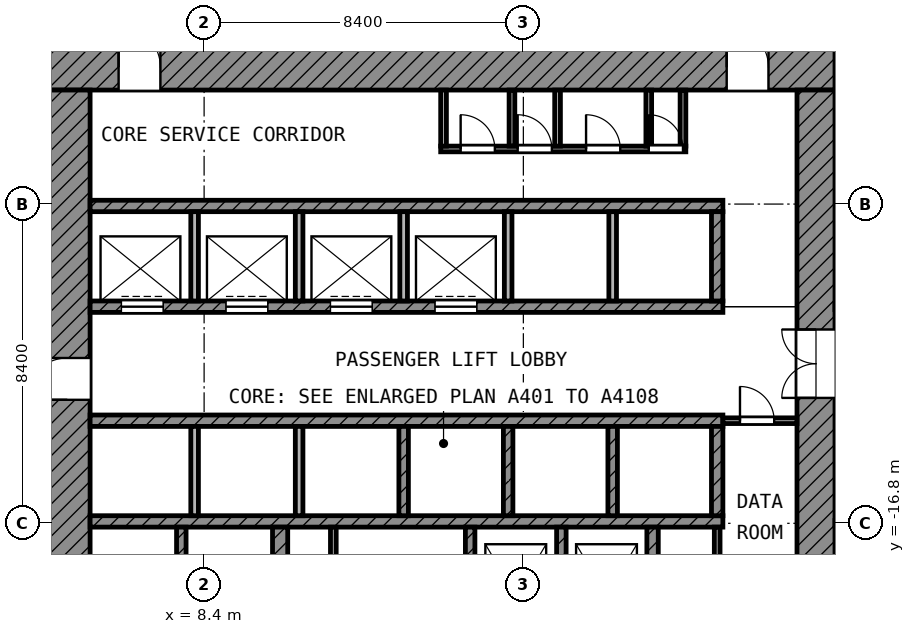
"""IFC4 building model, lengths in metres.
Left out: names, types, materials, properties, quantities, classifications, styles, units other than length and angle.
Written with IfcOpenShell. Run it as: python <this file> out.ifc"""

import sys

from ifc_helpers import new_model, si_unit, direction, frame, frame_2d, origin, place, context, subcontext, project, spatial, rectangle, extrude, element, fill, save


model = new_model("IFC4")
c1 = context("Model", 3, precision=1e-05, world=origin(), true_north=direction((0.0, 1.0)))
c2 = subcontext(c1, "Body", "Model", "MODEL_VIEW")
j1 = project(units=[si_unit("LENGTHUNIT", "METRE"), si_unit("PLANEANGLEUNIT", "RADIAN")], contexts=[c1])
p1 = place(None, origin())
s1 = spatial("IfcSite", under=j1, at=p1, CompositionType="ELEMENT")
p2 = place(p1, origin())
s2 = spatial("IfcBuilding", under=s1, at=p2, CompositionType="ELEMENT")
p3 = place(p2, frame((0.0, 0.0, 107.2)))
s3 = spatial("IfcBuildingStorey", under=s2, at=p3, CompositionType="ELEMENT", Elevation=107.2)
p4 = place(p3, frame((4.2, -4.8, 0.0), z_axis=(0.0, 0.0, 1.0), x_axis=(1.0, 0.0, 0.0)))
e1 = element("IfcWall", 1, at=p4, inside=s3, PredefinedType="SHEAR", context=c2, shape_type="SweptSolid", body=[
    extrude(rectangle(XDim=20.8, YDim=1.2, at=frame_2d((10.4, 0.0))), origin(), (0.0, 0.0, 1.0), 3.6),
])
p5 = place(p4, frame((1.95, 0.0, 0.0)))
e2 = element("IfcOpeningElement", 2, at=p5, cuts=e1, PredefinedType="OPENING", context=c2, shape_type="SweptSolid", body=[
    extrude(rectangle(XDim=1.1, YDim=2.1, at=frame_2d((0.55, 1.05))), frame((0.0, 0.61, 0.0), z_axis=(0.0, -1.0, 0.0), x_axis=(1.0, 0.0, 0.0)), (0.0, 0.0, 1.0), 1.22),
])
p6 = place(p4, frame((17.95, 0.0, 0.0)))
e3 = element("IfcOpeningElement", 3, at=p6, cuts=e1, PredefinedType="OPENING", context=c2, shape_type="SweptSolid", body=[
    extrude(rectangle(XDim=1.1, YDim=2.1, at=frame_2d((0.55, 1.05))), frame((0.0, 0.61, 0.0), z_axis=(0.0, -1.0, 0.0), x_axis=(1.0, 0.0, 0.0)), (0.0, 0.0, 1.0), 1.22),
])
p7 = place(p3, frame((4.8, -25.0, 0.0), z_axis=(0.0, 0.0, 1.0), x_axis=(0.0, 1.0, 0.0)))
e4 = element("IfcWall", 4, at=p7, inside=s3, PredefinedType="SHEAR", context=c2, shape_type="SweptSolid", body=[
    extrude(rectangle(XDim=19.6, YDim=1.2, at=frame_2d((9.8, 0.0))), origin(), (0.0, 0.0, 1.0), 3.6),
])
p8 = place(p7, frame((11.45, 0.0, 0.0)))
e5 = element("IfcOpeningElement", 5, at=p8, cuts=e4, PredefinedType="OPENING", context=c2, shape_type="SweptSolid", body=[
    extrude(rectangle(XDim=1.1, YDim=2.1, at=frame_2d((0.55, 1.05))), frame((0.0, 0.61, 0.0), z_axis=(0.0, -1.0, 0.0), x_axis=(1.0, 0.0, 0.0)), (0.0, 0.0, 1.0), 1.22),
])
p9 = place(p7, frame((2.15, 0.0, 0.0)))
e6 = element("IfcOpeningElement", 6, at=p9, cuts=e4, PredefinedType="OPENING", context=c2, shape_type="SweptSolid", body=[
    extrude(rectangle(XDim=1.1, YDim=2.1, at=frame_2d((0.55, 1.05))), frame((0.0, 0.61, 0.0), z_axis=(0.0, -1.0, 0.0), x_axis=(1.0, 0.0, 0.0)), (0.0, 0.0, 1.0), 1.22),
])
p10 = place(p3, frame((24.5, -24.0, 0.0), z_axis=(0.0, 0.0, 1.0), x_axis=(0.0, 1.0, 0.0)))
e7 = element("IfcWall", 7, at=p10, inside=s3, PredefinedType="SHEAR", context=c2, shape_type="SweptSolid", body=[
    extrude(rectangle(XDim=18.6, YDim=1.0, at=frame_2d((9.3, 0.0))), origin(), (0.0, 0.0, 1.0), 3.6),
])
p11 = place(p10, frame((10.5, 0.0, 0.0)))
e8 = element("IfcOpeningElement", 8, at=p11, cuts=e7, PredefinedType="OPENING", context=c2, shape_type="SweptSolid", body=[
    extrude(rectangle(XDim=1.8, YDim=2.1, at=frame_2d((0.9, 1.05))), frame((0.0, 0.51, 0.0), z_axis=(0.0, -1.0, 0.0), x_axis=(1.0, 0.0, 0.0)), (0.0, 0.0, 1.0), 1.02),
])
p12 = place(p3, frame((5.4, -8.45, 0.0), z_axis=(0.0, 0.0, 1.0), x_axis=(1.0, 0.0, 0.0)))
e9 = element("IfcWall", 9, at=p12, inside=s3, PredefinedType="SHEAR", context=c2, shape_type="SweptSolid", body=[
    extrude(rectangle(XDim=16.65, YDim=0.3, at=frame_2d((8.325, 0.0))), origin(), (0.0, 0.0, 1.0), 3.6),
])
p13 = place(p3, frame((5.4, -11.1, 0.0), z_axis=(0.0, 0.0, 1.0), x_axis=(1.0, 0.0, 0.0)))
e10 = element("IfcWall", 10, at=p13, inside=s3, PredefinedType="SHEAR", context=c2, shape_type="SweptSolid", body=[
    extrude(rectangle(XDim=16.65, YDim=0.3, at=frame_2d((8.325, 0.0))), origin(), (0.0, 0.0, 1.0), 3.6),
])
p14 = place(p13, frame((0.825, 0.0, 0.0)))
e11 = element("IfcOpeningElement", 11, at=p14, cuts=e10, PredefinedType="OPENING", context=c2, shape_type="SweptSolid", body=[
    extrude(rectangle(XDim=1.1, YDim=2.1, at=frame_2d((0.55, 1.05))), frame((0.0, 0.16, 0.0), z_axis=(0.0, -1.0, 0.0), x_axis=(1.0, 0.0, 0.0)), (0.0, 0.0, 1.0), 0.32),
])
p15 = place(p13, frame((3.575, 0.0, 0.0)))
e12 = element("IfcOpeningElement", 12, at=p15, cuts=e10, PredefinedType="OPENING", context=c2, shape_type="SweptSolid", body=[
    extrude(rectangle(XDim=1.1, YDim=2.1, at=frame_2d((0.55, 1.05))), frame((0.0, 0.16, 0.0), z_axis=(0.0, -1.0, 0.0), x_axis=(1.0, 0.0, 0.0)), (0.0, 0.0, 1.0), 0.32),
])
p16 = place(p13, frame((6.325, 0.0, 0.0)))
e13 = element("IfcOpeningElement", 13, at=p16, cuts=e10, PredefinedType="OPENING", context=c2, shape_type="SweptSolid", body=[
    extrude(rectangle(XDim=1.1, YDim=2.1, at=frame_2d((0.55, 1.05))), frame((0.0, 0.16, 0.0), z_axis=(0.0, -1.0, 0.0), x_axis=(1.0, 0.0, 0.0)), (0.0, 0.0, 1.0), 0.32),
])
p17 = place(p13, frame((9.075, 0.0, 0.0)))
e14 = element("IfcOpeningElement", 14, at=p17, cuts=e10, PredefinedType="OPENING", context=c2, shape_type="SweptSolid", body=[
    extrude(rectangle(XDim=1.1, YDim=2.1, at=frame_2d((0.55, 1.05))), frame((0.0, 0.16, 0.0), z_axis=(0.0, -1.0, 0.0), x_axis=(1.0, 0.0, 0.0)), (0.0, 0.0, 1.0), 0.32),
])
for number, where, z_axis, x_axis in (
    (15, (5.4, -14.1, 0.0), (0.0, 0.0, 1.0), (1.0, 0.0, 0.0)),
    (16, (5.4, -16.75, 0.0), (0.0, 0.0, 1.0), (1.0, 0.0, 0.0)),
):
    element("IfcWall", number, at=place(p3, frame(where, z_axis=z_axis, x_axis=x_axis)), inside=s3, PredefinedType="SHEAR", context=c2, shape_type="SweptSolid", body=[
        extrude(rectangle(XDim=16.65, YDim=0.3, at=frame_2d((8.325, 0.0))), origin(), (0.0, 0.0, 1.0), 3.6),
    ])
p18 = place(p3, frame((10.4, -20.05, 0.0), z_axis=(0.0, 0.0, 1.0), x_axis=(0.0, 1.0, 0.0)))
e17 = element("IfcWall", 17, at=p18, inside=s3, PredefinedType="SHEAR", context=c2, shape_type="SweptSolid", body=[
    extrude(rectangle(XDim=3.15, YDim=0.4, at=frame_2d((1.575, 0.0))), origin(), (0.0, 0.0, 1.0), 3.6),
])
p19 = place(p3, frame((20.2, -20.35, 0.0), z_axis=(0.0, 0.0, 1.0), x_axis=(0.0, 1.0, 0.0)))
e18 = element("IfcWall", 18, at=p19, inside=s3, PredefinedType="SHEAR", context=c2, shape_type="SweptSolid", body=[
    extrude(rectangle(XDim=3.45, YDim=0.3, at=frame_2d((1.725, 0.0))), origin(), (0.0, 0.0, 1.0), 3.6),
])
p20 = place(p3, frame((21.9, -10.95, 0.0), z_axis=(0.0, 0.0, 1.0), x_axis=(0.0, 1.0, 0.0)))
e19 = element("IfcWall", 19, at=p20, inside=s3, PredefinedType="SHEAR", context=c2, shape_type="SweptSolid", body=[
    extrude(rectangle(XDim=2.35, YDim=0.3, at=frame_2d((1.175, 0.0))), origin(), (0.0, 0.0, 1.0), 3.6),
])
p21 = place(p3, frame((21.9, -16.6, 0.0), z_axis=(0.0, 0.0, 1.0), x_axis=(0.0, 1.0, 0.0)))
e20 = element("IfcWall", 20, at=p21, inside=s3, PredefinedType="SHEAR", context=c2, shape_type="SweptSolid", body=[
    extrude(rectangle(XDim=2.35, YDim=0.3, at=frame_2d((1.175, 0.0))), origin(), (0.0, 0.0, 1.0), 3.6),
])
for number, where, z_axis, x_axis in (
    (21, (7.8, -20.05, 0.0), (0.0, 0.0, 1.0), (0.0, 1.0, 0.0)),
    (22, (15.4, -20.05, 0.0), (0.0, 0.0, 1.0), (0.0, 1.0, 0.0)),
    (23, (17.8, -20.05, 0.0), (0.0, 0.0, 1.0), (0.0, 1.0, 0.0)),
):
    element("IfcWall", number, at=place(p3, frame(where, z_axis=z_axis, x_axis=x_axis)), inside=s3, PredefinedType="SHEAR", context=c2, shape_type="SweptSolid", body=[
        extrude(rectangle(XDim=3.15, YDim=0.25, at=frame_2d((1.575, 0.0))), origin(), (0.0, 0.0, 1.0), 3.6),
    ])
for number, where, z_axis, x_axis in (
    (24, (8.15, -10.95, 0.0), (0.0, 0.0, 1.0), (0.0, 1.0, 0.0)),
    (25, (10.9, -10.95, 0.0), (0.0, 0.0, 1.0), (0.0, 1.0, 0.0)),
    (26, (13.65, -10.95, 0.0), (0.0, 0.0, 1.0), (0.0, 1.0, 0.0)),
    (27, (16.4, -10.95, 0.0), (0.0, 0.0, 1.0), (0.0, 1.0, 0.0)),
    (28, (19.15, -10.95, 0.0), (0.0, 0.0, 1.0), (0.0, 1.0, 0.0)),
):
    element("IfcWall", number, at=place(p3, frame(where, z_axis=z_axis, x_axis=x_axis)), inside=s3, PredefinedType="PARTITIONING", context=c2, shape_type="SweptSolid", body=[
        extrude(rectangle(XDim=2.35, YDim=0.2, at=frame_2d((1.175, 0.0))), origin(), (0.0, 0.0, 1.0), 3.6),
    ])
for number, where, z_axis, x_axis in (
    (29, (8.15, -16.6, 0.0), (0.0, 0.0, 1.0), (0.0, 1.0, 0.0)),
    (30, (10.9, -16.6, 0.0), (0.0, 0.0, 1.0), (0.0, 1.0, 0.0)),
):
    element("IfcWall", number, at=place(p3, frame(where, z_axis=z_axis, x_axis=x_axis)), inside=s3, PredefinedType="PARTITIONING", context=c2, shape_type="SweptSolid", body=[
        extrude(rectangle(XDim=2.35, YDim=0.2, at=frame_2d((1.175, 0.0))), origin(), (0.0, 0.0, 1.0), 3.6),
    ])
for number, where, z_axis, x_axis in (
    (31, (13.65, -16.6, 0.0), (0.0, 0.0, 1.0), (0.0, 1.0, 0.0)),
    (32, (16.4, -16.6, 0.0), (0.0, 0.0, 1.0), (0.0, 1.0, 0.0)),
    (33, (19.15, -16.6, 0.0), (0.0, 0.0, 1.0), (0.0, 1.0, 0.0)),
):
    element("IfcWall", number, at=place(p3, frame(where, z_axis=z_axis, x_axis=x_axis)), inside=s3, PredefinedType="SHEAR", context=c2, shape_type="SweptSolid", body=[
        extrude(rectangle(XDim=2.35, YDim=0.25, at=frame_2d((1.175, 0.0))), origin(), (0.0, 0.0, 1.0), 3.6),
    ])
p22 = place(p3, frame((21.9, -19.05, 0.0), z_axis=(0.0, 0.0, 1.0), x_axis=(0.0, 1.0, 0.0)))
e34 = element("IfcWall", 34, at=p22, inside=s3, PredefinedType="PARTITIONING", context=c2, shape_type="SweptSolid", body=[
    extrude(rectangle(XDim=2.15, YDim=0.15, at=frame_2d((1.075, 0.0))), origin(), (0.0, 0.0, 1.0), 3.6),
])
p23 = place(p3, frame((22.05, -14.1, 0.0), z_axis=(0.0, 0.0, 1.0), x_axis=(1.0, 0.0, 0.0)))
e35 = element("IfcWall", 35, at=p23, inside=s3, PredefinedType="PARTITIONING", context=c2, shape_type="SweptSolid", body=[
    extrude(rectangle(XDim=1.95, YDim=0.15, at=frame_2d((0.975, 0.0))), origin(), (0.0, 0.0, 1.0), 3.6),
])
p24 = place(p23, frame((0.45, 0.0, 0.0)))
e36 = element("IfcOpeningElement", 36, at=p24, cuts=e35, PredefinedType="OPENING", context=c2, shape_type="SweptSolid", body=[
    extrude(rectangle(XDim=0.9, YDim=2.1, at=frame_2d((0.45, 1.05))), frame((0.0, 0.085, 0.0), z_axis=(0.0, -1.0, 0.0), x_axis=(1.0, 0.0, 0.0)), (0.0, 0.0, 1.0), 0.17),
])
p25 = place(p3, frame((14.625, -6.95, 0.0), z_axis=(0.0, 0.0, 1.0), x_axis=(1.0, 0.0, 0.0)))
e37 = element("IfcWall", 37, at=p25, inside=s3, PredefinedType="PARTITIONING", context=c2, shape_type="SweptSolid", body=[
    extrude(rectangle(XDim=6.45, YDim=0.15, at=frame_2d((3.225, 0.0))), origin(), (0.0, 0.0, 1.0), 3.6),
])
p26 = place(p25, frame((0.525, 0.0, 0.0)))
e38 = element("IfcOpeningElement", 38, at=p26, cuts=e37, PredefinedType="OPENING", context=c2, shape_type="SweptSolid", body=[
    extrude(rectangle(XDim=0.9, YDim=2.1, at=frame_2d((0.45, 1.05))), frame((0.0, 0.085, 0.0), z_axis=(0.0, -1.0, 0.0), x_axis=(1.0, 0.0, 0.0)), (0.0, 0.0, 1.0), 0.17),
])
p27 = place(p25, frame((2.025, 0.0, 0.0)))
e39 = element("IfcOpeningElement", 39, at=p27, cuts=e37, PredefinedType="OPENING", context=c2, shape_type="SweptSolid", body=[
    extrude(rectangle(XDim=0.9, YDim=2.1, at=frame_2d((0.45, 1.05))), frame((0.0, 0.085, 0.0), z_axis=(0.0, -1.0, 0.0), x_axis=(1.0, 0.0, 0.0)), (0.0, 0.0, 1.0), 0.17),
])
p28 = place(p25, frame((3.825, 0.0, 0.0)))
e40 = element("IfcOpeningElement", 40, at=p28, cuts=e37, PredefinedType="OPENING", context=c2, shape_type="SweptSolid", body=[
    extrude(rectangle(XDim=0.9, YDim=2.1, at=frame_2d((0.45, 1.05))), frame((0.0, 0.085, 0.0), z_axis=(0.0, -1.0, 0.0), x_axis=(1.0, 0.0, 0.0)), (0.0, 0.0, 1.0), 0.17),
])
p29 = place(p25, frame((5.475, 0.0, 0.0)))
e41 = element("IfcOpeningElement", 41, at=p29, cuts=e37, PredefinedType="OPENING", context=c2, shape_type="SweptSolid", body=[
    extrude(rectangle(XDim=0.9, YDim=2.1, at=frame_2d((0.45, 1.05))), frame((0.0, 0.085, 0.0), z_axis=(0.0, -1.0, 0.0), x_axis=(1.0, 0.0, 0.0)), (0.0, 0.0, 1.0), 0.17),
])
p30 = place(p3, frame((11.8, -20.05, 0.0), z_axis=(0.0, 0.0, 1.0), x_axis=(0.0, 1.0, 0.0)))
e42 = element("IfcWall", 42, at=p30, inside=s3, PredefinedType="PARTITIONING", context=c2, shape_type="SweptSolid", body=[
    extrude(rectangle(XDim=3.15, YDim=0.15, at=frame_2d((1.575, 0.0))), origin(), (0.0, 0.0, 1.0), 3.6),
])
for number, where, z_axis, x_axis in (
    (43, (14.7, -6.875, 0.0), (0.0, 0.0, 1.0), (0.0, 1.0, 0.0)),
    (44, (16.5, -6.875, 0.0), (0.0, 0.0, 1.0), (0.0, 1.0, 0.0)),
    (45, (17.7, -6.875, 0.0), (0.0, 0.0, 1.0), (0.0, 1.0, 0.0)),
    (46, (20.1, -6.875, 0.0), (0.0, 0.0, 1.0), (0.0, 1.0, 0.0)),
    (47, (21.0, -6.875, 0.0), (0.0, 0.0, 1.0), (0.0, 1.0, 0.0)),
):
    element("IfcWall", number, at=place(p3, frame(where, z_axis=z_axis, x_axis=x_axis)), inside=s3, PredefinedType="PARTITIONING", context=c2, shape_type="SweptSolid", body=[
        extrude(rectangle(XDim=1.475, YDim=0.15, at=frame_2d((0.738, 0.0))), origin(), (0.0, 0.0, 1.0), 3.6),
    ])
p31 = place(p3, frame((25.0, -16.8, 0.0), z_axis=(0.0, 0.0, 1.0), x_axis=(1.0, 0.0, 0.0)))
e48 = element("IfcWall", 48, at=p31, inside=s3, PredefinedType="PARTITIONING", context=c2, shape_type="SweptSolid", body=[
    extrude(rectangle(XDim=54.72, YDim=0.15, at=frame_2d((27.36, 0.0))), origin(), (0.0, 0.0, 1.0), 3.6),
])
p32 = place(p31, frame((2.5, 0.0, 0.0)))
e49 = element("IfcOpeningElement", 49, at=p32, cuts=e48, PredefinedType="OPENING", context=c2, shape_type="SweptSolid", body=[
    extrude(rectangle(XDim=1.0, YDim=2.1, at=frame_2d((0.5, 1.05))), frame((0.0, 0.085, 0.0), z_axis=(0.0, -1.0, 0.0), x_axis=(1.0, 0.0, 0.0)), (0.0, 0.0, 1.0), 0.17),
])
p33 = place(p31, frame((1.1, 0.0, 0.0)))
e50 = element("IfcOpeningElement", 50, at=p33, cuts=e48, PredefinedType="OPENING", context=c2, shape_type="SweptSolid", body=[
    extrude(rectangle(XDim=1.0, YDim=2.1, at=frame_2d((0.5, 1.05))), frame((0.0, 0.085, 0.0), z_axis=(0.0, -1.0, 0.0), x_axis=(1.0, 0.0, 0.0)), (0.0, 0.0, 1.0), 0.17),
])
p34 = place(p31, frame((5.9, 0.0, 0.0)))
e51 = element("IfcOpeningElement", 51, at=p34, cuts=e48, PredefinedType="OPENING", context=c2, shape_type="SweptSolid", body=[
    extrude(rectangle(XDim=1.2, YDim=2.1, at=frame_2d((0.6, 1.05))), frame((0.0, 0.085, 0.0), z_axis=(0.0, -1.0, 0.0), x_axis=(1.0, 0.0, 0.0)), (0.0, 0.0, 1.0), 0.17),
])
p35 = place(p31, frame((10.05, 0.0, 0.0)))
e52 = element("IfcOpeningElement", 52, at=p35, cuts=e48, PredefinedType="OPENING", context=c2, shape_type="SweptSolid", body=[
    extrude(rectangle(XDim=1.0, YDim=2.1, at=frame_2d((0.5, 1.05))), frame((0.0, 0.085, 0.0), z_axis=(0.0, -1.0, 0.0), x_axis=(1.0, 0.0, 0.0)), (0.0, 0.0, 1.0), 0.17),
])
p36 = place(p31, frame((14.25, 0.0, 0.0)))
e53 = element("IfcOpeningElement", 53, at=p36, cuts=e48, PredefinedType="OPENING", context=c2, shape_type="SweptSolid", body=[
    extrude(rectangle(XDim=1.0, YDim=2.1, at=frame_2d((0.5, 1.05))), frame((0.0, 0.085, 0.0), z_axis=(0.0, -1.0, 0.0), x_axis=(1.0, 0.0, 0.0)), (0.0, 0.0, 1.0), 0.17),
])
p37 = place(p31, frame((18.75, 0.0, 0.0)))
e54 = element("IfcOpeningElement", 54, at=p37, cuts=e48, PredefinedType="OPENING", context=c2, shape_type="SweptSolid", body=[
    extrude(rectangle(XDim=1.0, YDim=2.1, at=frame_2d((0.5, 1.05))), frame((0.0, 0.085, 0.0), z_axis=(0.0, -1.0, 0.0), x_axis=(1.0, 0.0, 0.0)), (0.0, 0.0, 1.0), 0.17),
])
p38 = place(p31, frame((22.95, 0.0, 0.0)))
e55 = element("IfcOpeningElement", 55, at=p38, cuts=e48, PredefinedType="OPENING", context=c2, shape_type="SweptSolid", body=[
    extrude(rectangle(XDim=1.0, YDim=2.1, at=frame_2d((0.5, 1.05))), frame((0.0, 0.085, 0.0), z_axis=(0.0, -1.0, 0.0), x_axis=(1.0, 0.0, 0.0)), (0.0, 0.0, 1.0), 0.17),
])
p39 = place(p31, frame((26.7, 0.0, 0.0)))
e56 = element("IfcOpeningElement", 56, at=p39, cuts=e48, PredefinedType="OPENING", context=c2, shape_type="SweptSolid", body=[
    extrude(rectangle(XDim=1.0, YDim=2.1, at=frame_2d((0.5, 1.05))), frame((0.0, 0.085, 0.0), z_axis=(0.0, -1.0, 0.0), x_axis=(1.0, 0.0, 0.0)), (0.0, 0.0, 1.0), 0.17),
])
p40 = place(p31, frame((30.9, 0.0, 0.0)))
e57 = element("IfcOpeningElement", 57, at=p40, cuts=e48, PredefinedType="OPENING", context=c2, shape_type="SweptSolid", body=[
    extrude(rectangle(XDim=1.0, YDim=2.1, at=frame_2d((0.5, 1.05))), frame((0.0, 0.085, 0.0), z_axis=(0.0, -1.0, 0.0), x_axis=(1.0, 0.0, 0.0)), (0.0, 0.0, 1.0), 0.17),
])
p41 = place(p31, frame((35.4, 0.0, 0.0)))
e58 = element("IfcOpeningElement", 58, at=p41, cuts=e48, PredefinedType="OPENING", context=c2, shape_type="SweptSolid", body=[
    extrude(rectangle(XDim=1.0, YDim=2.1, at=frame_2d((0.5, 1.05))), frame((0.0, 0.085, 0.0), z_axis=(0.0, -1.0, 0.0), x_axis=(1.0, 0.0, 0.0)), (0.0, 0.0, 1.0), 0.17),
])
p42 = place(p31, frame((48.7, 0.0, 0.0)))
e59 = element("IfcOpeningElement", 59, at=p42, cuts=e48, PredefinedType="OPENING", context=c2, shape_type="SweptSolid", body=[
    extrude(rectangle(XDim=1.0, YDim=2.1, at=frame_2d((0.5, 1.05))), frame((0.0, 0.085, 0.0), z_axis=(0.0, -1.0, 0.0), x_axis=(1.0, 0.0, 0.0)), (0.0, 0.0, 1.0), 0.17),
])
p43 = place(p31, frame((43.1, 0.0, 0.0)))
e60 = element("IfcOpeningElement", 60, at=p43, cuts=e48, PredefinedType="OPENING", context=c2, shape_type="SweptSolid", body=[
    extrude(rectangle(XDim=1.0, YDim=2.1, at=frame_2d((0.5, 1.05))), frame((0.0, 0.085, 0.0), z_axis=(0.0, -1.0, 0.0), x_axis=(1.0, 0.0, 0.0)), (0.0, 0.0, 1.0), 0.17),
])
p44 = place(p14, origin())
e61 = element("IfcDoor", 61, at=p44, inside=s3, OperationType="DOUBLE_DOOR_SLIDING", PredefinedType="DOOR", context=c2, shape_type="SweptSolid", body=[
    extrude(rectangle(XDim=1.1, YDim=2.1, at=frame_2d((0.55, 1.05))), frame((0.0, 0.025, 0.0), z_axis=(0.0, -1.0, 0.0), x_axis=(1.0, 0.0, 0.0)), (0.0, 0.0, 1.0), 0.05),
])
fill(e11, e61)
p45 = place(p15, origin())
e62 = element("IfcDoor", 62, at=p45, inside=s3, OperationType="DOUBLE_DOOR_SLIDING", PredefinedType="DOOR", context=c2, shape_type="SweptSolid", body=[
    extrude(rectangle(XDim=1.1, YDim=2.1, at=frame_2d((0.55, 1.05))), frame((0.0, 0.025, 0.0), z_axis=(0.0, -1.0, 0.0), x_axis=(1.0, 0.0, 0.0)), (0.0, 0.0, 1.0), 0.05),
])
fill(e12, e62)
p46 = place(p16, origin())
e63 = element("IfcDoor", 63, at=p46, inside=s3, OperationType="DOUBLE_DOOR_SLIDING", PredefinedType="DOOR", context=c2, shape_type="SweptSolid", body=[
    extrude(rectangle(XDim=1.1, YDim=2.1, at=frame_2d((0.55, 1.05))), frame((0.0, 0.025, 0.0), z_axis=(0.0, -1.0, 0.0), x_axis=(1.0, 0.0, 0.0)), (0.0, 0.0, 1.0), 0.05),
])
fill(e13, e63)
p47 = place(p17, origin())
e64 = element("IfcDoor", 64, at=p47, inside=s3, OperationType="DOUBLE_DOOR_SLIDING", PredefinedType="DOOR", context=c2, shape_type="SweptSolid", body=[
    extrude(rectangle(XDim=1.1, YDim=2.1, at=frame_2d((0.55, 1.05))), frame((0.0, 0.025, 0.0), z_axis=(0.0, -1.0, 0.0), x_axis=(1.0, 0.0, 0.0)), (0.0, 0.0, 1.0), 0.05),
])
fill(e14, e64)
p48 = place(p8, origin())
e65 = element("IfcDoor", 65, at=p48, inside=s3, OperationType="SINGLE_SWING_LEFT", PredefinedType="DOOR", context=c2, shape_type="SweptSolid", body=[
    extrude(rectangle(XDim=1.1, YDim=2.1, at=frame_2d((0.55, 1.05))), frame((0.0, 0.025, 0.0), z_axis=(0.0, -1.0, 0.0), x_axis=(1.0, 0.0, 0.0)), (0.0, 0.0, 1.0), 0.05),
])
fill(e5, e65)
p49 = place(p5, origin())
e66 = element("IfcDoor", 66, at=p49, inside=s3, OperationType="SINGLE_SWING_LEFT", PredefinedType="DOOR", context=c2, shape_type="SweptSolid", body=[
    extrude(rectangle(XDim=1.1, YDim=2.1, at=frame_2d((0.55, 1.05))), frame((0.0, 0.025, 0.0), z_axis=(0.0, -1.0, 0.0), x_axis=(1.0, 0.0, 0.0)), (0.0, 0.0, 1.0), 0.05),
])
fill(e2, e66)
p50 = place(p6, origin())
e67 = element("IfcDoor", 67, at=p50, inside=s3, OperationType="SINGLE_SWING_LEFT", PredefinedType="DOOR", context=c2, shape_type="SweptSolid", body=[
    extrude(rectangle(XDim=1.1, YDim=2.1, at=frame_2d((0.55, 1.05))), frame((0.0, 0.025, 0.0), z_axis=(0.0, -1.0, 0.0), x_axis=(1.0, 0.0, 0.0)), (0.0, 0.0, 1.0), 0.05),
])
fill(e3, e67)
p51 = place(p11, origin())
e68 = element("IfcDoor", 68, at=p51, inside=s3, OperationType="DOUBLE_DOOR_SINGLE_SWING", PredefinedType="DOOR", context=c2, shape_type="SweptSolid", body=[
    extrude(rectangle(XDim=1.8, YDim=2.1, at=frame_2d((0.9, 1.05))), frame((0.0, 0.025, 0.0), z_axis=(0.0, -1.0, 0.0), x_axis=(1.0, 0.0, 0.0)), (0.0, 0.0, 1.0), 0.05),
])
fill(e8, e68)
p52 = place(p26, origin())
e69 = element("IfcDoor", 69, at=p52, inside=s3, OperationType="SINGLE_SWING_LEFT", PredefinedType="DOOR", context=c2, shape_type="SweptSolid", body=[
    extrude(rectangle(XDim=0.9, YDim=2.1, at=frame_2d((0.45, 1.05))), frame((0.0, 0.025, 0.0), z_axis=(0.0, -1.0, 0.0), x_axis=(1.0, 0.0, 0.0)), (0.0, 0.0, 1.0), 0.05),
])
fill(e38, e69)
p53 = place(p27, origin())
e70 = element("IfcDoor", 70, at=p53, inside=s3, OperationType="SINGLE_SWING_LEFT", PredefinedType="DOOR", context=c2, shape_type="SweptSolid", body=[
    extrude(rectangle(XDim=0.9, YDim=2.1, at=frame_2d((0.45, 1.05))), frame((0.0, 0.025, 0.0), z_axis=(0.0, -1.0, 0.0), x_axis=(1.0, 0.0, 0.0)), (0.0, 0.0, 1.0), 0.05),
])
fill(e39, e70)
p54 = place(p28, origin())
e71 = element("IfcDoor", 71, at=p54, inside=s3, OperationType="SINGLE_SWING_LEFT", PredefinedType="DOOR", context=c2, shape_type="SweptSolid", body=[
    extrude(rectangle(XDim=0.9, YDim=2.1, at=frame_2d((0.45, 1.05))), frame((0.0, 0.025, 0.0), z_axis=(0.0, -1.0, 0.0), x_axis=(1.0, 0.0, 0.0)), (0.0, 0.0, 1.0), 0.05),
])
fill(e40, e71)
p55 = place(p29, origin())
e72 = element("IfcDoor", 72, at=p55, inside=s3, OperationType="SINGLE_SWING_LEFT", PredefinedType="DOOR", context=c2, shape_type="SweptSolid", body=[
    extrude(rectangle(XDim=0.9, YDim=2.1, at=frame_2d((0.45, 1.05))), frame((0.0, 0.025, 0.0), z_axis=(0.0, -1.0, 0.0), x_axis=(1.0, 0.0, 0.0)), (0.0, 0.0, 1.0), 0.05),
])
fill(e41, e72)
p56 = place(p24, origin())
e73 = element("IfcDoor", 73, at=p56, inside=s3, OperationType="SINGLE_SWING_LEFT", PredefinedType="DOOR", context=c2, shape_type="SweptSolid", body=[
    extrude(rectangle(XDim=0.9, YDim=2.1, at=frame_2d((0.45, 1.05))), frame((0.0, 0.025, 0.0), z_axis=(0.0, -1.0, 0.0), x_axis=(1.0, 0.0, 0.0)), (0.0, 0.0, 1.0), 0.05),
])
fill(e36, e73)
save(model, sys.argv[1])
